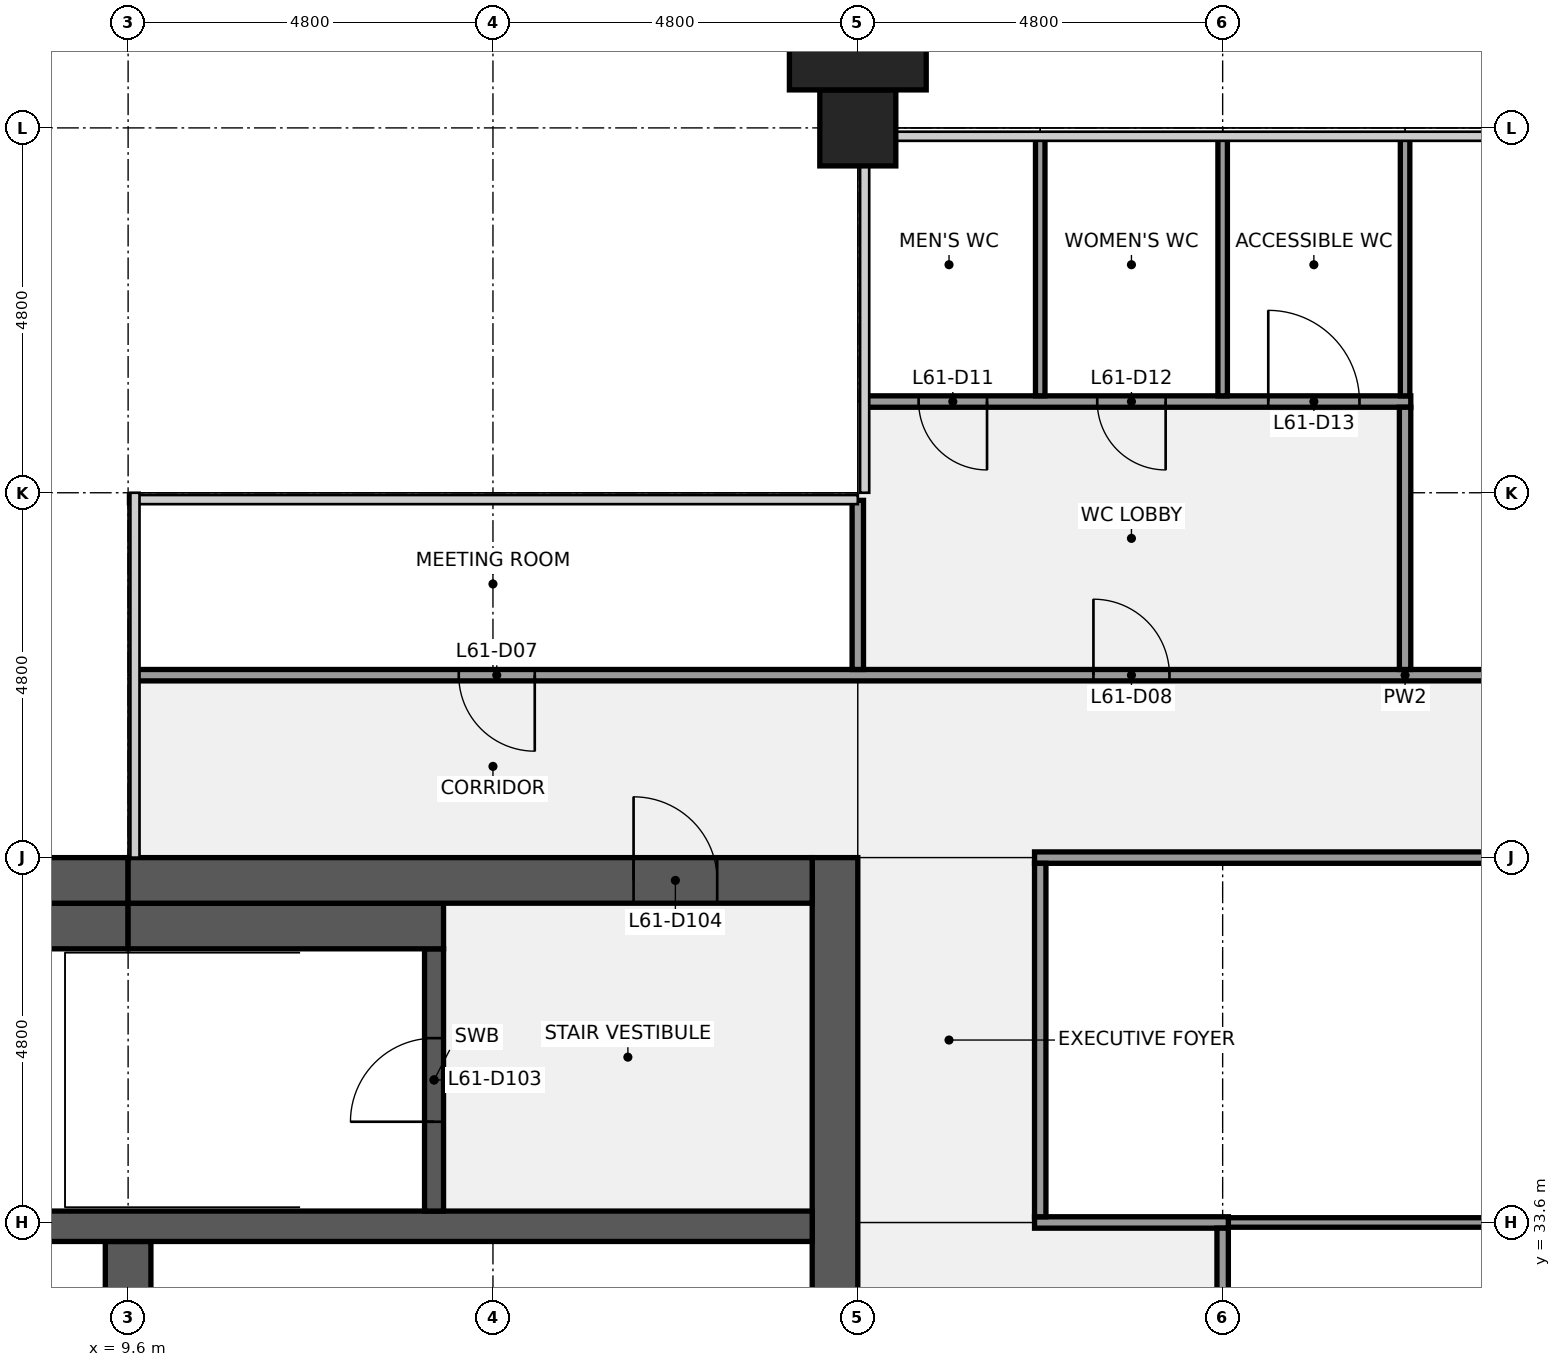
"""IFC4 building model, lengths in metres.
Left out: names, types, materials, properties, quantities, classifications, styles, units other than length and angle.
Written with IfcOpenShell. Run it as: python <this file> out.ifc"""

import sys

from ifc_helpers import new_model, si_unit, direction, frame, frame_2d, origin, origin_2d, place, context, subcontext, project, spatial, rectangle, extrude, element, fill, save


model = new_model("IFC4")
c1 = context("Model", 3, precision=1e-05, world=origin(), true_north=direction((0.0, 1.0)))
c2 = subcontext(c1, "Body", "Model", "MODEL_VIEW")
j1 = project(units=[si_unit("LENGTHUNIT", "METRE"), si_unit("PLANEANGLEUNIT", "RADIAN")], contexts=[c1])
p1 = place(None, origin())
s1 = spatial("IfcSite", under=j1, at=p1, CompositionType="ELEMENT")
p2 = place(p1, origin())
s2 = spatial("IfcBuilding", under=s1, at=p2, CompositionType="ELEMENT")
p3 = place(p2, frame((0.0, 0.0, 282.3)))
s3 = spatial("IfcBuildingStorey", under=s2, at=p3, CompositionType="ELEMENT", Elevation=282.3)
p4 = place(p3, frame((19.2, 48.0, 0.0), z_axis=(0.0, 0.0, 1.0), x_axis=(1.0, 0.0, 0.0)))
e1 = element("IfcColumn", 1, at=p4, inside=s3, PredefinedType="COLUMN", context=c2, shape_type="SweptSolid", body=[
    extrude(rectangle(XDim=1.0, YDim=1.0, at=origin_2d()), origin(), (0.0, 0.0, 1.0), 4.0),
])
p5 = place(p3, frame((18.9, 38.4, 0.0), z_axis=(0.0, 0.0, 1.0), x_axis=(0.0, -1.0, 0.0)))
e2 = element("IfcWall", 2, at=p5, inside=s3, PredefinedType="SHEAR", context=c2, shape_type="SweptSolid", body=[
    extrude(rectangle(XDim=28.8, YDim=0.6, at=frame_2d((14.4, 0.0))), origin(), (0.0, 0.0, 1.0), 3.84),
])
p6 = place(p5, frame((18.3, 0.0, 0.0)))
e3 = element("IfcOpeningElement", 3, at=p6, cuts=e2, PredefinedType="OPENING", context=c2, shape_type="SweptSolid", body=[
    extrude(rectangle(XDim=1.8, YDim=2.1, at=frame_2d((0.9, 1.05))), frame((0.0, 0.31, 0.0), z_axis=(0.0, -1.0, 0.0), x_axis=(1.0, 0.0, 0.0)), (0.0, 0.0, 1.0), 0.62),
])
p7 = place(p5, frame((8.7, 0.0, 0.0)))
e4 = element("IfcOpeningElement", 4, at=p7, cuts=e2, PredefinedType="OPENING", context=c2, shape_type="SweptSolid", body=[
    extrude(rectangle(XDim=1.8, YDim=2.1, at=frame_2d((0.9, 1.05))), frame((0.0, 0.31, 0.0), z_axis=(0.0, -1.0, 0.0), x_axis=(1.0, 0.0, 0.0)), (0.0, 0.0, 1.0), 0.62),
])
p8 = place(p3, frame((9.6, 30.75, 0.0), z_axis=(0.0, 0.0, 1.0), x_axis=(0.0, 1.0, 0.0)))
e5 = element("IfcWall", 5, at=p8, inside=s3, PredefinedType="SHEAR", context=c2, shape_type="SweptSolid", body=[
    extrude(rectangle(XDim=2.6, YDim=0.6, at=frame_2d((1.3, 0.0))), origin(), (0.0, 0.0, 1.0), 3.84),
])
p9 = place(p3, frame((0.6, 33.55, 0.0), z_axis=(0.0, 0.0, 1.0), x_axis=(1.0, 0.0, 0.0)))
e6 = element("IfcWall", 6, at=p9, inside=s3, PredefinedType="SHEAR", context=c2, shape_type="SweptSolid", body=[
    extrude(rectangle(XDim=18.0, YDim=0.4, at=frame_2d((9.0, 0.0))), origin(), (0.0, 0.0, 1.0), 3.84),
])
p10 = place(p3, frame((13.625, 33.75, 0.0), z_axis=(0.0, 0.0, 1.0), x_axis=(0.0, 1.0, 0.0)))
e7 = element("IfcWall", 7, at=p10, inside=s3, PredefinedType="SHEAR", context=c2, shape_type="SweptSolid", body=[
    extrude(rectangle(XDim=3.45, YDim=0.25, at=frame_2d((1.725, 0.0))), origin(), (0.0, 0.0, 1.0), 3.84),
])
p11 = place(p10, frame((1.175, 0.0, 0.0)))
e8 = element("IfcOpeningElement", 8, at=p11, cuts=e7, PredefinedType="OPENING", context=c2, shape_type="SweptSolid", body=[
    extrude(rectangle(XDim=1.1, YDim=2.1, at=frame_2d((0.55, 1.05))), frame((0.0, 0.135, 0.0), z_axis=(0.0, -1.0, 0.0), x_axis=(1.0, 0.0, 0.0)), (0.0, 0.0, 1.0), 0.27),
])
p12 = place(p3, frame((6.25, 37.5, 0.0), z_axis=(0.0, 0.0, 1.0), x_axis=(1.0, 0.0, 0.0)))
e9 = element("IfcWall", 9, at=p12, inside=s3, PredefinedType="SHEAR", context=c2, shape_type="SweptSolid", body=[
    extrude(rectangle(XDim=3.35, YDim=0.6, at=frame_2d((1.675, 0.0))), origin(), (0.0, 0.0, 1.0), 3.84),
])
p13 = place(p3, frame((9.6, 37.5, 0.0), z_axis=(0.0, 0.0, 1.0), x_axis=(1.0, 0.0, 0.0)))
e10 = element("IfcWall", 10, at=p13, inside=s3, PredefinedType="SHEAR", context=c2, shape_type="SweptSolid", body=[
    extrude(rectangle(XDim=4.15, YDim=0.6, at=frame_2d((2.075, 0.0))), origin(), (0.0, 0.0, 1.0), 3.84),
])
p14 = place(p3, frame((0.6, 38.1, 0.0), z_axis=(0.0, 0.0, 1.0), x_axis=(1.0, 0.0, 0.0)))
e11 = element("IfcWall", 11, at=p14, inside=s3, PredefinedType="SHEAR", context=c2, shape_type="SweptSolid", body=[
    extrude(rectangle(XDim=9.0, YDim=0.6, at=frame_2d((4.5, 0.0))), origin(), (0.0, 0.0, 1.0), 3.84),
])
p15 = place(p14, frame((5.7, 0.0, 0.9)))
e12 = element("IfcOpeningElement", 12, at=p15, cuts=e11, PredefinedType="OPENING", context=c2, shape_type="SweptSolid", body=[
    extrude(rectangle(XDim=1.8, YDim=1.5, at=frame_2d((0.9, 0.75))), frame((0.0, 0.31, 0.0), z_axis=(0.0, -1.0, 0.0), x_axis=(1.0, 0.0, 0.0)), (0.0, 0.0, 1.0), 0.62),
])
p16 = place(p3, frame((9.6, 38.1, 0.0), z_axis=(0.0, 0.0, 1.0), x_axis=(1.0, 0.0, 0.0)))
e13 = element("IfcWall", 13, at=p16, inside=s3, PredefinedType="SHEAR", context=c2, shape_type="SweptSolid", body=[
    extrude(rectangle(XDim=9.0, YDim=0.6, at=frame_2d((4.5, 0.0))), origin(), (0.0, 0.0, 1.0), 3.84),
])
p17 = place(p16, frame((6.65, 0.0, 0.0)))
e14 = element("IfcOpeningElement", 14, at=p17, cuts=e13, PredefinedType="OPENING", context=c2, shape_type="SweptSolid", body=[
    extrude(rectangle(XDim=1.1, YDim=2.1, at=frame_2d((0.55, 1.05))), frame((0.0, 0.31, 0.0), z_axis=(0.0, -1.0, 0.0), x_axis=(1.0, 0.0, 0.0)), (0.0, 0.0, 1.0), 0.62),
])
p18 = place(p3, frame((24.075, 33.6, 0.0), z_axis=(0.0, 0.0, 1.0), x_axis=(1.0, 0.0, 0.0)))
e15 = element("IfcWall", 15, at=p18, inside=s3, PredefinedType="PARTITIONING", context=c2, shape_type="SweptSolid", body=[
    extrude(rectangle(XDim=9.6, YDim=0.125, at=frame_2d((4.8, 0.0))), origin(), (0.0, 0.0, 1.0), 2.87),
])
p19 = place(p3, frame((21.525, 33.6, 0.0), z_axis=(0.0, 0.0, 1.0), x_axis=(1.0, 0.0, 0.0)))
e16 = element("IfcWall", 16, at=p19, inside=s3, PredefinedType="PARTITIONING", context=c2, shape_type="SweptSolid", body=[
    extrude(rectangle(XDim=2.55, YDim=0.15, at=frame_2d((1.275, 0.0))), origin(), (0.0, 0.0, 1.0), 2.87),
])
p20 = place(p3, frame((21.525, 38.4, 0.0), z_axis=(0.0, 0.0, 1.0), x_axis=(1.0, 0.0, 0.0)))
e17 = element("IfcWall", 17, at=p20, inside=s3, PredefinedType="PARTITIONING", context=c2, shape_type="SweptSolid", body=[
    extrude(rectangle(XDim=14.55, YDim=0.15, at=frame_2d((7.275, 0.0))), origin(), (0.0, 0.0, 1.0), 2.87),
])
p21 = place(p20, frame((6.775, 0.0, 0.0)))
e18 = element("IfcOpeningElement", 18, at=p21, cuts=e17, PredefinedType="OPENING", context=c2, shape_type="SweptSolid", body=[
    extrude(rectangle(XDim=1.0, YDim=2.1, at=frame_2d((0.5, 1.05))), frame((0.0, 0.085, 0.0), z_axis=(0.0, -1.0, 0.0), x_axis=(1.0, 0.0, 0.0)), (0.0, 0.0, 1.0), 0.17),
])
p22 = place(p3, frame((9.7, 40.8, 0.0), z_axis=(0.0, 0.0, 1.0), x_axis=(1.0, 0.0, 0.0)))
e19 = element("IfcWall", 19, at=p22, inside=s3, PredefinedType="PARTITIONING", context=c2, shape_type="SweptSolid", body=[
    extrude(rectangle(XDim=33.4, YDim=0.15, at=frame_2d((16.7, 0.0))), origin(), (0.0, 0.0, 1.0), 2.87),
])
p23 = place(p22, frame((4.25, 0.0, 0.0)))
e20 = element("IfcOpeningElement", 20, at=p23, cuts=e19, PredefinedType="OPENING", context=c2, shape_type="SweptSolid", body=[
    extrude(rectangle(XDim=1.0, YDim=2.1, at=frame_2d((0.5, 1.05))), frame((0.0, 0.085, 0.0), z_axis=(0.0, -1.0, 0.0), x_axis=(1.0, 0.0, 0.0)), (0.0, 0.0, 1.0), 0.17),
])
p24 = place(p22, frame((12.6, 0.0, 0.0)))
e21 = element("IfcOpeningElement", 21, at=p24, cuts=e19, PredefinedType="OPENING", context=c2, shape_type="SweptSolid", body=[
    extrude(rectangle(XDim=1.0, YDim=2.1, at=frame_2d((0.5, 1.05))), frame((0.0, 0.085, 0.0), z_axis=(0.0, -1.0, 0.0), x_axis=(1.0, 0.0, 0.0)), (0.0, 0.0, 1.0), 0.17),
])
p25 = place(p22, frame((22.2, 0.0, 0.0)))
e22 = element("IfcOpeningElement", 22, at=p25, cuts=e19, PredefinedType="OPENING", context=c2, shape_type="SweptSolid", body=[
    extrude(rectangle(XDim=1.0, YDim=2.1, at=frame_2d((0.5, 1.05))), frame((0.0, 0.085, 0.0), z_axis=(0.0, -1.0, 0.0), x_axis=(1.0, 0.0, 0.0)), (0.0, 0.0, 1.0), 0.17),
])
p26 = place(p22, frame((30.55, 0.0, 0.0)))
e23 = element("IfcOpeningElement", 23, at=p26, cuts=e19, PredefinedType="OPENING", context=c2, shape_type="SweptSolid", body=[
    extrude(rectangle(XDim=1.0, YDim=2.1, at=frame_2d((0.5, 1.05))), frame((0.0, 0.085, 0.0), z_axis=(0.0, -1.0, 0.0), x_axis=(1.0, 0.0, 0.0)), (0.0, 0.0, 1.0), 0.17),
])
p27 = place(p3, frame((19.3, 44.4, 0.0), z_axis=(0.0, 0.0, 1.0), x_axis=(1.0, 0.0, 0.0)))
e24 = element("IfcWall", 24, at=p27, inside=s3, PredefinedType="PARTITIONING", context=c2, shape_type="SweptSolid", body=[
    extrude(rectangle(XDim=7.175, YDim=0.15, at=frame_2d((3.587, 0.0))), origin(), (0.0, 0.0, 1.0), 2.87),
])
p28 = place(p27, frame((0.7, 0.0, 0.0)))
e25 = element("IfcOpeningElement", 25, at=p28, cuts=e24, PredefinedType="OPENING", context=c2, shape_type="SweptSolid", body=[
    extrude(rectangle(XDim=0.9, YDim=2.1, at=frame_2d((0.45, 1.05))), frame((0.0, 0.085, 0.0), z_axis=(0.0, -1.0, 0.0), x_axis=(1.0, 0.0, 0.0)), (0.0, 0.0, 1.0), 0.17),
])
p29 = place(p27, frame((3.05, 0.0, 0.0)))
e26 = element("IfcOpeningElement", 26, at=p29, cuts=e24, PredefinedType="OPENING", context=c2, shape_type="SweptSolid", body=[
    extrude(rectangle(XDim=0.9, YDim=2.1, at=frame_2d((0.45, 1.05))), frame((0.0, 0.085, 0.0), z_axis=(0.0, -1.0, 0.0), x_axis=(1.0, 0.0, 0.0)), (0.0, 0.0, 1.0), 0.17),
])
p30 = place(p27, frame((5.3, 0.0, 0.0)))
e27 = element("IfcOpeningElement", 27, at=p30, cuts=e24, PredefinedType="OPENING", context=c2, shape_type="SweptSolid", body=[
    extrude(rectangle(XDim=1.2, YDim=2.1, at=frame_2d((0.6, 1.05))), frame((0.0, 0.085, 0.0), z_axis=(0.0, -1.0, 0.0), x_axis=(1.0, 0.0, 0.0)), (0.0, 0.0, 1.0), 0.17),
])
p31 = place(p3, frame((19.2, 40.875, 0.0), z_axis=(0.0, 0.0, 1.0), x_axis=(0.0, 1.0, 0.0)))
e28 = element("IfcWall", 28, at=p31, inside=s3, PredefinedType="PARTITIONING", context=c2, shape_type="SweptSolid", body=[
    extrude(rectangle(XDim=2.225, YDim=0.15, at=frame_2d((1.113, 0.0))), origin(), (0.0, 0.0, 1.0), 2.87),
])
p32 = place(p3, frame((21.6, 44.475, 0.0), z_axis=(0.0, 0.0, 1.0), x_axis=(0.0, 1.0, 0.0)))
e29 = element("IfcWall", 29, at=p32, inside=s3, PredefinedType="PARTITIONING", context=c2, shape_type="SweptSolid", body=[
    extrude(rectangle(XDim=3.425, YDim=0.125, at=frame_2d((1.712, 0.0))), origin(), (0.0, 0.0, 1.0), 2.87),
])
p33 = place(p3, frame((21.6, 33.675, 0.0), z_axis=(0.0, 0.0, 1.0), x_axis=(0.0, 1.0, 0.0)))
e30 = element("IfcWall", 30, at=p33, inside=s3, PredefinedType="PARTITIONING", context=c2, shape_type="SweptSolid", body=[
    extrude(rectangle(XDim=4.65, YDim=0.15, at=frame_2d((2.325, 0.0))), origin(), (0.0, 0.0, 1.0), 2.87),
])
p34 = place(p3, frame((24.0, 44.475, 0.0), z_axis=(0.0, 0.0, 1.0), x_axis=(0.0, 1.0, 0.0)))
e31 = element("IfcWall", 31, at=p34, inside=s3, PredefinedType="PARTITIONING", context=c2, shape_type="SweptSolid", body=[
    extrude(rectangle(XDim=3.425, YDim=0.125, at=frame_2d((1.712, 0.0))), origin(), (0.0, 0.0, 1.0), 2.87),
])
p35 = place(p3, frame((24.0, 28.875, 0.0), z_axis=(0.0, 0.0, 1.0), x_axis=(0.0, 1.0, 0.0)))
e32 = element("IfcWall", 32, at=p35, inside=s3, PredefinedType="PARTITIONING", context=c2, shape_type="SweptSolid", body=[
    extrude(rectangle(XDim=4.65, YDim=0.15, at=frame_2d((2.325, 0.0))), origin(), (0.0, 0.0, 1.0), 2.87),
])
p36 = place(p3, frame((26.4, 44.475, 0.0), z_axis=(0.0, 0.0, 1.0), x_axis=(0.0, 1.0, 0.0)))
e33 = element("IfcWall", 33, at=p36, inside=s3, PredefinedType="PARTITIONING", context=c2, shape_type="SweptSolid", body=[
    extrude(rectangle(XDim=3.425, YDim=0.125, at=frame_2d((1.712, 0.0))), origin(), (0.0, 0.0, 1.0), 2.87),
])
p37 = place(p3, frame((26.4, 40.875, 0.0), z_axis=(0.0, 0.0, 1.0), x_axis=(0.0, 1.0, 0.0)))
e34 = element("IfcWall", 34, at=p37, inside=s3, PredefinedType="PARTITIONING", context=c2, shape_type="SweptSolid", body=[
    extrude(rectangle(XDim=3.45, YDim=0.15, at=frame_2d((1.725, 0.0))), origin(), (0.0, 0.0, 1.0), 2.87),
])
p38 = place(p3, frame((19.2, 49.0, 0.0), z_axis=(0.0, 0.0, 1.0), x_axis=(1.0, 0.0, 0.0)))
e35 = element("IfcColumn", 35, at=p38, inside=s3, PredefinedType="PILASTER", context=c2, shape_type="SweptSolid", body=[
    extrude(rectangle(XDim=1.8, YDim=1.0, at=origin_2d()), origin(), (0.0, 0.0, 1.0), 4.0),
])
p39 = place(p11, origin())
e36 = element("IfcDoor", 36, at=p39, inside=s3, OperationType="SINGLE_SWING_LEFT", PredefinedType="DOOR", context=c2, shape_type="SweptSolid", body=[
    extrude(rectangle(XDim=1.1, YDim=2.1, at=frame_2d((0.55, 1.05))), frame((0.0, 0.025, 0.0), z_axis=(0.0, -1.0, 0.0), x_axis=(1.0, 0.0, 0.0)), (0.0, 0.0, 1.0), 0.05),
])
fill(e8, e36)
p40 = place(p17, origin())
e37 = element("IfcDoor", 37, at=p40, inside=s3, OperationType="SINGLE_SWING_LEFT", PredefinedType="DOOR", context=c2, shape_type="SweptSolid", body=[
    extrude(rectangle(XDim=1.1, YDim=2.1, at=frame_2d((0.55, 1.05))), frame((0.0, 0.025, 0.0), z_axis=(0.0, -1.0, 0.0), x_axis=(1.0, 0.0, 0.0)), (0.0, 0.0, 1.0), 0.05),
])
fill(e14, e37)
p41 = place(p23, origin())
e38 = element("IfcDoor", 38, at=p41, inside=s3, OperationType="SINGLE_SWING_RIGHT", PredefinedType="DOOR", context=c2, shape_type="SweptSolid", body=[
    extrude(rectangle(XDim=1.0, YDim=2.1, at=frame_2d((0.5, 1.05))), frame((0.0, 0.025, 0.0), z_axis=(0.0, -1.0, 0.0), x_axis=(1.0, 0.0, 0.0)), (0.0, 0.0, 1.0), 0.05),
])
fill(e20, e38)
p42 = place(p24, origin())
e39 = element("IfcDoor", 39, at=p42, inside=s3, OperationType="SINGLE_SWING_LEFT", PredefinedType="DOOR", context=c2, shape_type="SweptSolid", body=[
    extrude(rectangle(XDim=1.0, YDim=2.1, at=frame_2d((0.5, 1.05))), frame((0.0, 0.025, 0.0), z_axis=(0.0, -1.0, 0.0), x_axis=(1.0, 0.0, 0.0)), (0.0, 0.0, 1.0), 0.05),
])
fill(e21, e39)
p43 = place(p28, origin())
e40 = element("IfcDoor", 40, at=p43, inside=s3, OperationType="SINGLE_SWING_RIGHT", PredefinedType="DOOR", context=c2, shape_type="SweptSolid", body=[
    extrude(rectangle(XDim=0.9, YDim=2.1, at=frame_2d((0.45, 1.05))), frame((0.0, 0.025, 0.0), z_axis=(0.0, -1.0, 0.0), x_axis=(1.0, 0.0, 0.0)), (0.0, 0.0, 1.0), 0.05),
])
fill(e25, e40)
p44 = place(p29, origin())
e41 = element("IfcDoor", 41, at=p44, inside=s3, OperationType="SINGLE_SWING_RIGHT", PredefinedType="DOOR", context=c2, shape_type="SweptSolid", body=[
    extrude(rectangle(XDim=0.9, YDim=2.1, at=frame_2d((0.45, 1.05))), frame((0.0, 0.025, 0.0), z_axis=(0.0, -1.0, 0.0), x_axis=(1.0, 0.0, 0.0)), (0.0, 0.0, 1.0), 0.05),
])
fill(e26, e41)
p45 = place(p30, origin())
e42 = element("IfcDoor", 42, at=p45, inside=s3, OperationType="SINGLE_SWING_LEFT", PredefinedType="DOOR", context=c2, shape_type="SweptSolid", body=[
    extrude(rectangle(XDim=1.2, YDim=2.1, at=frame_2d((0.6, 1.05))), frame((0.0, 0.025, 0.0), z_axis=(0.0, -1.0, 0.0), x_axis=(1.0, 0.0, 0.0)), (0.0, 0.0, 1.0), 0.05),
])
fill(e27, e42)
save(model, sys.argv[1])
